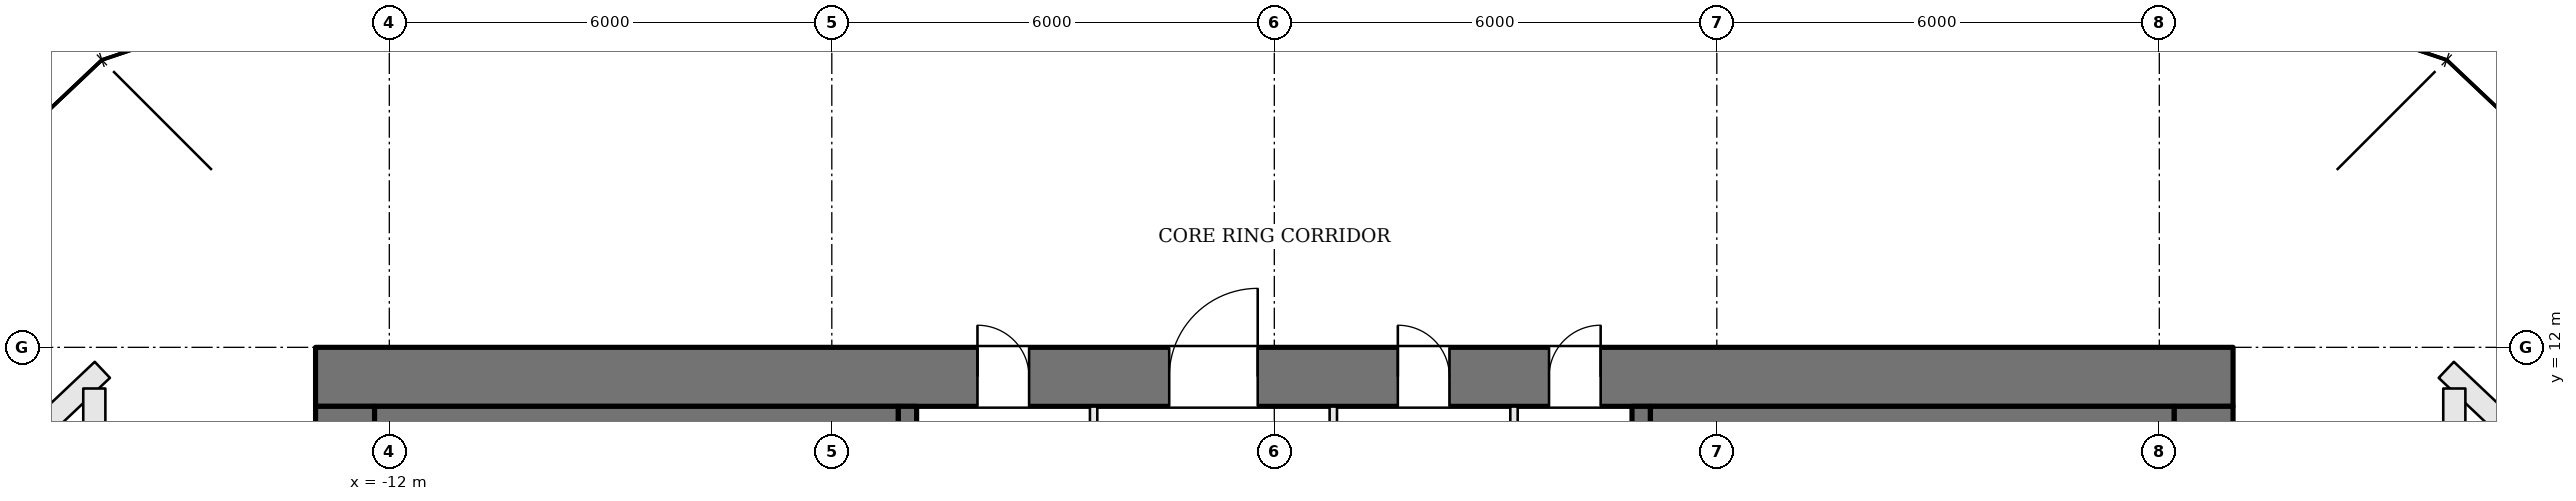
"""IFC4 building model, lengths in metres.
Left out: names, types, materials, properties, quantities, classifications, styles, units other than length and angle.
Written with IfcOpenShell. Run it as: python <this file> out.ifc"""

import sys

from ifc_helpers import new_model, si_unit, direction, frame, frame_2d, origin, place, context, subcontext, project, spatial, rectangle, extrude, element, fill, save


model = new_model("IFC4")
c1 = context("Model", 3, precision=1e-05, world=origin(), true_north=direction((0.0, 1.0)))
c2 = subcontext(c1, "Body", "Model", "MODEL_VIEW")
j1 = project(units=[si_unit("LENGTHUNIT", "METRE"), si_unit("PLANEANGLEUNIT", "RADIAN")], contexts=[c1])
p1 = place(None, origin())
s1 = spatial("IfcSite", under=j1, at=p1, CompositionType="ELEMENT")
p2 = place(p1, origin())
s2 = spatial("IfcBuilding", under=s1, at=p2, CompositionType="ELEMENT")
p3 = place(p2, frame((0.0, 0.0, 312.0)))
s3 = spatial("IfcBuildingStorey", under=s2, at=p3, CompositionType="ELEMENT", Elevation=312.0)
p4 = place(p3, frame((-13.0, 11.6, 0.0), z_axis=(0.0, 0.0, 1.0), x_axis=(1.0, 0.0, 0.0)))
e1 = element("IfcWall", 1, at=p4, inside=s3, PredefinedType="SHEAR", context=c2, shape_type="SweptSolid", body=[
    extrude(rectangle(XDim=26.0, YDim=0.8, at=frame_2d((13.0, 0.0))), origin(), (0.0, 0.0, 1.0), 4.2),
])
p5 = place(p4, frame((8.975, 0.0, 0.0)))
e2 = element("IfcOpeningElement", 2, at=p5, cuts=e1, PredefinedType="OPENING", context=c2, shape_type="SweptSolid", body=[
    extrude(rectangle(XDim=0.7, YDim=2.1, at=frame_2d((0.35, 1.05))), frame((0.0, 0.41, 0.0), z_axis=(0.0, -1.0, 0.0), x_axis=(1.0, 0.0, 0.0)), (0.0, 0.0, 1.0), 0.82),
])
p6 = place(p4, frame((11.575, 0.0, 0.0)))
e3 = element("IfcOpeningElement", 3, at=p6, cuts=e1, PredefinedType="OPENING", context=c2, shape_type="SweptSolid", body=[
    extrude(rectangle(XDim=1.2, YDim=2.1, at=frame_2d((0.6, 1.05))), frame((0.0, 0.41, 0.0), z_axis=(0.0, -1.0, 0.0), x_axis=(1.0, 0.0, 0.0)), (0.0, 0.0, 1.0), 0.82),
])
p7 = place(p4, frame((14.675, 0.0, 0.0)))
e4 = element("IfcOpeningElement", 4, at=p7, cuts=e1, PredefinedType="OPENING", context=c2, shape_type="SweptSolid", body=[
    extrude(rectangle(XDim=0.7, YDim=2.1, at=frame_2d((0.35, 1.05))), frame((0.0, 0.41, 0.0), z_axis=(0.0, -1.0, 0.0), x_axis=(1.0, 0.0, 0.0)), (0.0, 0.0, 1.0), 0.82),
])
p8 = place(p4, frame((16.725, 0.0, 0.0)))
e5 = element("IfcOpeningElement", 5, at=p8, cuts=e1, PredefinedType="OPENING", context=c2, shape_type="SweptSolid", body=[
    extrude(rectangle(XDim=0.7, YDim=2.1, at=frame_2d((0.35, 1.05))), frame((0.0, 0.41, 0.0), z_axis=(0.0, -1.0, 0.0), x_axis=(1.0, 0.0, 0.0)), (0.0, 0.0, 1.0), 0.82),
])
p9 = place(p3, frame((12.6, -2.2, 0.0), z_axis=(0.0, 0.0, 1.0), x_axis=(0.0, 1.0, 0.0)))
e6 = element("IfcWall", 6, at=p9, inside=s3, PredefinedType="SHEAR", context=c2, shape_type="SweptSolid", body=[
    extrude(rectangle(XDim=13.4, YDim=0.8, at=frame_2d((6.7, 0.0))), origin(), (0.0, 0.0, 1.0), 4.2),
])
p10 = place(p9, frame((7.4, 0.0, 0.0)))
e7 = element("IfcOpeningElement", 7, at=p10, cuts=e6, PredefinedType="OPENING", context=c2, shape_type="SweptSolid", body=[
    extrude(rectangle(XDim=1.8, YDim=2.1, at=frame_2d((0.9, 1.05))), frame((0.0, 0.41, 0.0), z_axis=(0.0, -1.0, 0.0), x_axis=(1.0, 0.0, 0.0)), (0.0, 0.0, 1.0), 0.82),
])
p11 = place(p3, frame((-12.6, -2.2, 0.0), z_axis=(0.0, 0.0, 1.0), x_axis=(0.0, 1.0, 0.0)))
e8 = element("IfcWall", 8, at=p11, inside=s3, PredefinedType="SHEAR", context=c2, shape_type="SweptSolid", body=[
    extrude(rectangle(XDim=13.4, YDim=0.8, at=frame_2d((6.7, 0.0))), origin(), (0.0, 0.0, 1.0), 4.2),
])
p12 = place(p11, frame((4.2, 0.0, 0.0)))
e9 = element("IfcOpeningElement", 9, at=p12, cuts=e8, PredefinedType="OPENING", context=c2, shape_type="SweptSolid", body=[
    extrude(rectangle(XDim=1.8, YDim=2.1, at=frame_2d((0.9, 1.05))), frame((0.0, 0.41, 0.0), z_axis=(0.0, -1.0, 0.0), x_axis=(1.0, 0.0, 0.0)), (0.0, 0.0, 1.0), 0.82),
])
p13 = place(p3, frame((-4.975, -2.2, 0.0), z_axis=(0.0, 0.0, 1.0), x_axis=(0.0, 1.0, 0.0)))
e10 = element("IfcWall", 10, at=p13, inside=s3, PredefinedType="SOLIDWALL", context=c2, shape_type="SweptSolid", body=[
    extrude(rectangle(XDim=13.4, YDim=0.25, at=frame_2d((6.7, 0.0))), origin(), (0.0, 0.0, 1.0), 4.0),
])
p14 = place(p13, frame((5.25, 0.0, 0.0)))
e11 = element("IfcOpeningElement", 11, at=p14, cuts=e10, PredefinedType="OPENING", context=c2, shape_type="SweptSolid", body=[
    extrude(rectangle(XDim=1.2, YDim=2.1, at=frame_2d((0.6, 1.05))), frame((0.0, 0.135, 0.0), z_axis=(0.0, -1.0, 0.0), x_axis=(1.0, 0.0, 0.0)), (0.0, 0.0, 1.0), 0.27),
])
p15 = place(p3, frame((4.975, 11.2, 0.0), z_axis=(0.0, 0.0, 1.0), x_axis=(0.0, -1.0, 0.0)))
e12 = element("IfcWall", 12, at=p15, inside=s3, PredefinedType="SOLIDWALL", context=c2, shape_type="SweptSolid", body=[
    extrude(rectangle(XDim=13.4, YDim=0.25, at=frame_2d((6.7, 0.0))), origin(), (0.0, 0.0, 1.0), 4.0),
])
p16 = place(p15, frame((5.25, 0.0, 0.0)))
e13 = element("IfcOpeningElement", 13, at=p16, cuts=e12, PredefinedType="OPENING", context=c2, shape_type="SweptSolid", body=[
    extrude(rectangle(XDim=1.2, YDim=2.1, at=frame_2d((0.6, 1.05))), frame((0.0, 0.135, 0.0), z_axis=(0.0, -1.0, 0.0), x_axis=(1.0, 0.0, 0.0)), (0.0, 0.0, 1.0), 0.27),
])
for number, where, z_axis, x_axis in (
    (14, (-12.2, 10.9, 0.0), (0.0, 0.0, 1.0), (1.0, 0.0, 0.0)),
    (15, (12.2, 10.9, 0.0), (0.0, 0.0, 1.0), (-1.0, 0.0, 0.0)),
):
    element("IfcWall", number, at=place(p3, frame(where, z_axis=z_axis, x_axis=x_axis)), inside=s3, PredefinedType="SOLIDWALL", context=c2, shape_type="SweptSolid", body=[
        extrude(rectangle(XDim=7.1, YDim=0.6, at=frame_2d((3.55, 0.0))), origin(), (0.0, 0.0, 1.0), 4.0),
    ])
for number, where, z_axis, x_axis in (
    (16, (-2.45, 8.6, 0.0), (0.0, 0.0, 1.0), (0.0, 1.0, 0.0)),
    (17, (0.8, 8.6, 0.0), (0.0, 0.0, 1.0), (0.0, 1.0, 0.0)),
    (18, (3.25, 8.6, 0.0), (0.0, 0.0, 1.0), (0.0, 1.0, 0.0)),
):
    element("IfcWall", number, at=place(p3, frame(where, z_axis=z_axis, x_axis=x_axis)), inside=s3, PredefinedType="PARTITIONING", context=c2, shape_type="SweptSolid", body=[
        extrude(rectangle(XDim=2.6, YDim=0.1, at=frame_2d((1.3, 0.0))), origin(), (0.0, 0.0, 1.0), 4.0),
    ])
p17 = place(p3, frame((-19.671, 8.12, 0.0), z_axis=(0.0, 0.0, 1.0), x_axis=(0.726518435151, 0.687146973642, 0.0)))
e19 = element("IfcWall", 19, at=p17, inside=s3, PredefinedType="SOLIDWALL", context=c2, shape_type="SweptSolid", body=[
    extrude(rectangle(XDim=5.203, YDim=0.3, at=frame_2d((2.601, 0.0))), origin(), (0.0, 0.0, 1.0), 3.534),
])
p18 = place(p3, frame((-16.0, 11.442, 0.0), z_axis=(0.0, 0.0, 1.0), x_axis=(0.0, -1.0, 0.0)))
e20 = element("IfcWall", 20, at=p18, inside=s3, PredefinedType="SOLIDWALL", context=c2, shape_type="SweptSolid", body=[
    extrude(rectangle(XDim=17.292, YDim=0.3, at=frame_2d((8.646, 0.0))), origin(), (0.0, 0.0, 1.0), 3.534),
])
p19 = place(p18, frame((6.646, 0.0, 0.0)))
e21 = element("IfcOpeningElement", 21, at=p19, cuts=e20, PredefinedType="OPENING", context=c2, shape_type="SweptSolid", body=[
    extrude(rectangle(XDim=1.0, YDim=2.1, at=frame_2d((0.5, 1.05))), frame((0.0, 0.16, 0.0), z_axis=(0.0, -1.0, 0.0), x_axis=(1.0, 0.0, 0.0)), (0.0, 0.0, 1.0), 0.32),
])
p20 = place(p3, frame((15.891, 11.695, 0.0), z_axis=(0.0, 0.0, 1.0), x_axis=(0.726531870531, -0.687132768178, 0.0)))
e22 = element("IfcWall", 22, at=p20, inside=s3, PredefinedType="SOLIDWALL", context=c2, shape_type="SweptSolid", body=[
    extrude(rectangle(XDim=5.503, YDim=0.3, at=frame_2d((2.751, 0.0))), origin(), (0.0, 0.0, 1.0), 3.534),
])
p21 = place(p3, frame((16.0, -5.85, 0.0), z_axis=(0.0, 0.0, 1.0), x_axis=(0.0, 1.0, 0.0)))
e23 = element("IfcWall", 23, at=p21, inside=s3, PredefinedType="SOLIDWALL", context=c2, shape_type="SweptSolid", body=[
    extrude(rectangle(XDim=17.292, YDim=0.3, at=frame_2d((8.646, 0.0))), origin(), (0.0, 0.0, 1.0), 3.534),
])
p22 = place(p21, frame((9.646, 0.0, 0.0)))
e24 = element("IfcOpeningElement", 24, at=p22, cuts=e23, PredefinedType="OPENING", context=c2, shape_type="SweptSolid", body=[
    extrude(rectangle(XDim=1.0, YDim=2.1, at=frame_2d((0.5, 1.05))), frame((0.0, 0.16, 0.0), z_axis=(0.0, -1.0, 0.0), x_axis=(1.0, 0.0, 0.0)), (0.0, 0.0, 1.0), 0.32),
])
p23 = place(p5, origin())
e25 = element("IfcDoor", 25, at=p23, inside=s3, OperationType="SINGLE_SWING_LEFT", PredefinedType="DOOR", context=c2, shape_type="SweptSolid", body=[
    extrude(rectangle(XDim=0.7, YDim=2.1, at=frame_2d((0.35, 1.05))), frame((0.0, 0.025, 0.0), z_axis=(0.0, -1.0, 0.0), x_axis=(1.0, 0.0, 0.0)), (0.0, 0.0, 1.0), 0.05),
])
fill(e2, e25)
p24 = place(p6, origin())
e26 = element("IfcDoor", 26, at=p24, inside=s3, OperationType="SINGLE_SWING_RIGHT", PredefinedType="DOOR", context=c2, shape_type="SweptSolid", body=[
    extrude(rectangle(XDim=1.2, YDim=2.1, at=frame_2d((0.6, 1.05))), frame((0.0, 0.025, 0.0), z_axis=(0.0, -1.0, 0.0), x_axis=(1.0, 0.0, 0.0)), (0.0, 0.0, 1.0), 0.05),
])
fill(e3, e26)
p25 = place(p7, origin())
e27 = element("IfcDoor", 27, at=p25, inside=s3, OperationType="SINGLE_SWING_LEFT", PredefinedType="DOOR", context=c2, shape_type="SweptSolid", body=[
    extrude(rectangle(XDim=0.7, YDim=2.1, at=frame_2d((0.35, 1.05))), frame((0.0, 0.025, 0.0), z_axis=(0.0, -1.0, 0.0), x_axis=(1.0, 0.0, 0.0)), (0.0, 0.0, 1.0), 0.05),
])
fill(e4, e27)
p26 = place(p8, origin())
e28 = element("IfcDoor", 28, at=p26, inside=s3, OperationType="SINGLE_SWING_RIGHT", PredefinedType="DOOR", context=c2, shape_type="SweptSolid", body=[
    extrude(rectangle(XDim=0.7, YDim=2.1, at=frame_2d((0.35, 1.05))), frame((0.0, 0.025, 0.0), z_axis=(0.0, -1.0, 0.0), x_axis=(1.0, 0.0, 0.0)), (0.0, 0.0, 1.0), 0.05),
])
fill(e5, e28)
save(model, sys.argv[1])
